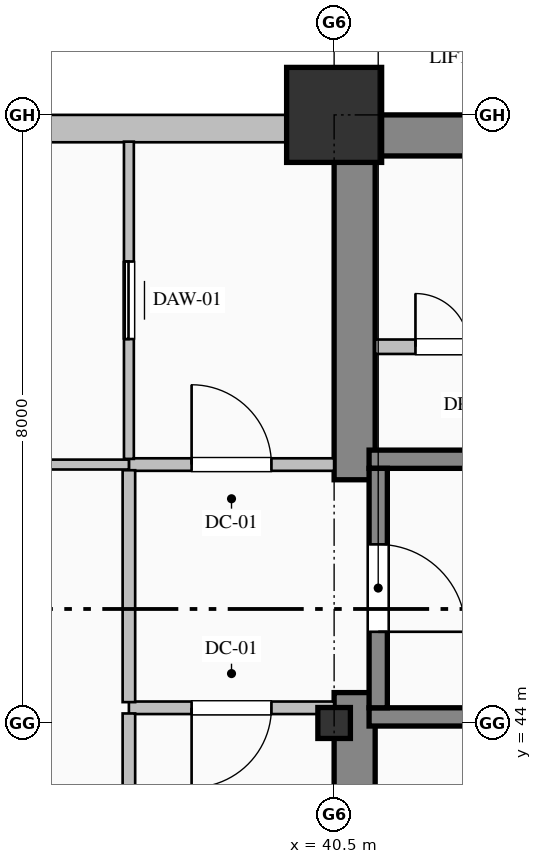
"""IFC4 building model, lengths in metres.
Left out: names, types, materials, properties, quantities, classifications, styles, units other than length and angle.
Written with IfcOpenShell. Run it as: python <this file> out.ifc"""

import sys

from ifc_helpers import new_model, si_unit, direction, frame, frame_2d, origin, origin_2d, place, context, subcontext, project, spatial, rectangle, hollow_rectangle, i_section, extrude, element, fill, save


model = new_model("IFC4")
c1 = context("Model", 3, precision=1e-05, world=origin(), true_north=direction((0.0, 1.0)))
c2 = subcontext(c1, "Body", "Model", "MODEL_VIEW")
j1 = project(units=[si_unit("LENGTHUNIT", "METRE"), si_unit("PLANEANGLEUNIT", "RADIAN")], contexts=[c1])
p1 = place(None, origin())
s1 = spatial("IfcSite", under=j1, at=p1, CompositionType="ELEMENT")
p2 = place(p1, origin())
s2 = spatial("IfcBuilding", under=s1, at=p2, CompositionType="ELEMENT")
p3 = place(p2, frame((0.0, 0.0, 80.2)))
s3 = spatial("IfcBuildingStorey", under=s2, at=p3, CompositionType="ELEMENT", Elevation=80.2)
p4 = place(p3, frame((40.5, 51.73, 0.0), z_axis=(0.0, 0.0, 1.0), x_axis=(1.0, 0.0, 0.0)))
e1 = element("IfcWall", 1, at=p4, inside=s3, PredefinedType="SHEAR", context=c2, shape_type="SweptSolid", body=[
    extrude(rectangle(XDim=23.5, YDim=0.54, at=frame_2d((11.75, 0.0))), origin(), (0.0, 0.0, 1.0), 3.75),
])
p5 = place(p3, frame((40.77, 36.54, 0.0), z_axis=(0.0, 0.0, 1.0), x_axis=(0.0, 1.0, 0.0)))
e2 = element("IfcWall", 2, at=p5, inside=s3, PredefinedType="SHEAR", context=c2, shape_type="SweptSolid", body=[
    extrude(rectangle(XDim=7.86, YDim=0.54, at=frame_2d((3.93, 0.0))), origin(), (0.0, 0.0, 1.0), 3.75),
])
p6 = place(p3, frame((40.77, 47.2, 0.0), z_axis=(0.0, 0.0, 1.0), x_axis=(0.0, 1.0, 0.0)))
e3 = element("IfcWall", 3, at=p6, inside=s3, PredefinedType="SHEAR", context=c2, shape_type="SweptSolid", body=[
    extrude(rectangle(XDim=4.26, YDim=0.54, at=frame_2d((2.13, 0.0))), origin(), (0.0, 0.0, 1.0), 3.75),
])
p7 = place(p3, frame((40.5, 44.0, 0.0), z_axis=(0.0, 0.0, 1.0), x_axis=(1.0, 0.0, 0.0)))
e4 = element("IfcColumn", 4, at=p7, inside=s3, PredefinedType="COLUMN", context=c2, shape_type="SweptSolid", body=[
    extrude(i_section(OverallWidth=0.407, OverallDepth=0.428, WebThickness=0.02, FlangeThickness=0.035, FilletRadius=0.022, at=origin_2d()), origin(), (0.0, 0.0, 1.0), 4.0),
])
p8 = place(p3, frame((40.5, 52.0, 0.0), z_axis=(0.0, 0.0, 1.0), x_axis=(1.0, 0.0, 0.0)))
e5 = element("IfcColumn", 5, at=p8, inside=s3, PredefinedType="COLUMN", context=c2, shape_type="SweptSolid", body=[
    extrude(hollow_rectangle(XDim=1.25, YDim=1.25, WallThickness=0.045, at=origin_2d()), origin(), (0.0, 0.0, 1.0), 4.0),
])
p9 = place(p3, frame((4.0, 51.82, 0.0), z_axis=(0.0, 0.0, 1.0), x_axis=(1.0, 0.0, 0.0)))
e6 = element("IfcWall", 6, at=p9, inside=s3, PredefinedType="SOLIDWALL", context=c2, shape_type="SweptSolid", body=[
    extrude(rectangle(XDim=36.52, YDim=0.36, at=frame_2d((18.26, 0.0))), origin(), (0.0, 0.0, 1.0), 3.25),
])
p10 = place(p9, frame((6.15, 0.0, 0.85)))
e7 = element("IfcOpeningElement", 7, at=p10, cuts=e6, PredefinedType="OPENING", context=c2, shape_type="SweptSolid", body=[
    extrude(rectangle(XDim=2.1, YDim=2.05, at=frame_2d((1.05, 1.025))), frame((0.0, 0.19, 0.0), z_axis=(0.0, -1.0, 0.0), x_axis=(1.0, 0.0, 0.0)), (0.0, 0.0, 1.0), 0.38),
])
p11 = place(p9, frame((13.5, 0.0, 0.85)))
e8 = element("IfcOpeningElement", 8, at=p11, cuts=e6, PredefinedType="OPENING", context=c2, shape_type="SweptSolid", body=[
    extrude(rectangle(XDim=1.8, YDim=2.05, at=frame_2d((0.9, 1.025))), frame((0.0, 0.19, 0.0), z_axis=(0.0, -1.0, 0.0), x_axis=(1.0, 0.0, 0.0)), (0.0, 0.0, 1.0), 0.38),
])
p12 = place(p9, frame((16.95, 0.0, 0.85)))
e9 = element("IfcOpeningElement", 9, at=p12, cuts=e6, PredefinedType="OPENING", context=c2, shape_type="SweptSolid", body=[
    extrude(rectangle(XDim=2.1, YDim=2.05, at=frame_2d((1.05, 1.025))), frame((0.0, 0.19, 0.0), z_axis=(0.0, -1.0, 0.0), x_axis=(1.0, 0.0, 0.0)), (0.0, 0.0, 1.0), 0.38),
])
p13 = place(p9, frame((24.3, 0.0, 0.85)))
e10 = element("IfcOpeningElement", 10, at=p13, cuts=e6, PredefinedType="OPENING", context=c2, shape_type="SweptSolid", body=[
    extrude(rectangle(XDim=1.8, YDim=2.05, at=frame_2d((0.9, 1.025))), frame((0.0, 0.19, 0.0), z_axis=(0.0, -1.0, 0.0), x_axis=(1.0, 0.0, 0.0)), (0.0, 0.0, 1.0), 0.38),
])
for number, where, z_axis, x_axis in (
    (11, (40.96, 47.47, 0.0), (0.0, 0.0, 1.0), (1.0, 0.0, 0.0)),
    (12, (49.04, 44.08, 0.0), (0.0, 0.0, 1.0), (-1.0, 0.0, 0.0)),
):
    element("IfcWall", number, at=place(p3, frame(where, z_axis=z_axis, x_axis=x_axis)), inside=s3, PredefinedType="SOLIDWALL", context=c2, shape_type="SweptSolid", body=[
        extrude(rectangle(XDim=8.08, YDim=0.24, at=frame_2d((4.04, 0.0))), origin(), (0.0, 0.0, 1.0), 4.0),
    ])
p14 = place(p3, frame((41.08, 47.35, 0.0), z_axis=(0.0, 0.0, 1.0), x_axis=(0.0, -1.0, 0.0)))
e13 = element("IfcWall", 13, at=p14, inside=s3, PredefinedType="SOLIDWALL", context=c2, shape_type="SweptSolid", body=[
    extrude(rectangle(XDim=3.15, YDim=0.24, at=frame_2d((1.575, 0.0))), origin(), (0.0, 0.0, 1.0), 4.0),
])
p15 = place(p14, frame((1.0, 0.0, 0.0)))
e14 = element("IfcOpeningElement", 14, at=p15, cuts=e13, PredefinedType="OPENING", context=c2, shape_type="SweptSolid", body=[
    extrude(rectangle(XDim=1.15, YDim=2.2, at=frame_2d((0.575, 1.1))), frame((0.0, 0.13, 0.0), z_axis=(0.0, -1.0, 0.0), x_axis=(1.0, 0.0, 0.0)), (0.0, 0.0, 1.0), 0.26),
])
p16 = place(p3, frame((37.8, 47.4, 0.0), z_axis=(0.0, 0.0, 1.0), x_axis=(1.0, 0.0, 0.0)))
e15 = element("IfcWall", 15, at=p16, inside=s3, PredefinedType="PARTITIONING", context=c2, shape_type="SweptSolid", body=[
    extrude(rectangle(XDim=2.7, YDim=0.165, at=frame_2d((1.35, 0.0))), origin(), (0.0, 0.0, 1.0), 3.75),
])
p17 = place(p16, frame((0.825, 0.0, 0.0)))
e16 = element("IfcOpeningElement", 16, at=p17, cuts=e15, PredefinedType="OPENING", context=c2, shape_type="SweptSolid", body=[
    extrude(rectangle(XDim=1.05, YDim=2.15, at=frame_2d((0.525, 1.075))), frame((0.0, 0.093, 0.0), z_axis=(0.0, -1.0, 0.0), x_axis=(1.0, 0.0, 0.0)), (0.0, 0.0, 1.0), 0.185),
])
p18 = place(p3, frame((40.5, 44.2, 0.0), z_axis=(0.0, 0.0, 1.0), x_axis=(-1.0, 0.0, 0.0)))
e17 = element("IfcWall", 17, at=p18, inside=s3, PredefinedType="PARTITIONING", context=c2, shape_type="SweptSolid", body=[
    extrude(rectangle(XDim=2.7, YDim=0.165, at=frame_2d((1.35, 0.0))), origin(), (0.0, 0.0, 1.0), 3.75),
])
p19 = place(p18, frame((0.825, 0.0, 0.0)))
e18 = element("IfcOpeningElement", 18, at=p19, cuts=e17, PredefinedType="OPENING", context=c2, shape_type="SweptSolid", body=[
    extrude(rectangle(XDim=1.05, YDim=2.15, at=frame_2d((0.525, 1.075))), frame((0.0, 0.093, 0.0), z_axis=(0.0, -1.0, 0.0), x_axis=(1.0, 0.0, 0.0)), (0.0, 0.0, 1.0), 0.185),
])
p20 = place(p3, frame((37.8, 44.274, 0.0), z_axis=(0.0, 0.0, 1.0), x_axis=(0.0, 1.0, 0.0)))
e19 = element("IfcWall", 19, at=p20, inside=s3, PredefinedType="PARTITIONING", context=c2, shape_type="SweptSolid", body=[
    extrude(rectangle(XDim=3.051, YDim=0.165, at=frame_2d((1.525, 0.0))), origin(), (0.0, 0.0, 1.0), 3.75),
])
p21 = place(p3, frame((37.8, 47.475, 0.0), z_axis=(0.0, 0.0, 1.0), x_axis=(0.0, 1.0, 0.0)))
e20 = element("IfcWall", 20, at=p21, inside=s3, PredefinedType="PARTITIONING", context=c2, shape_type="SweptSolid", body=[
    extrude(rectangle(XDim=4.173, YDim=0.13, at=frame_2d((2.087, 0.0))), origin(), (0.0, 0.0, 1.0), 3.75),
])
p22 = place(p21, frame((1.577, 0.0, 0.0)))
e21 = element("IfcOpeningElement", 21, at=p22, cuts=e20, PredefinedType="OPENING", context=c2, shape_type="SweptSolid", body=[
    extrude(rectangle(XDim=1.02, YDim=2.15, at=frame_2d((0.51, 1.075))), frame((0.0, 0.075, 0.0), z_axis=(0.0, -1.0, 0.0), x_axis=(1.0, 0.0, 0.0)), (0.0, 0.0, 1.0), 0.15),
])
p23 = place(p3, frame((37.8, 47.4, 0.0), z_axis=(0.0, 0.0, 1.0), x_axis=(-1.0, 0.0, 0.0)))
e22 = element("IfcWall", 22, at=p23, inside=s3, PredefinedType="PARTITIONING", context=c2, shape_type="SweptSolid", body=[
    extrude(rectangle(XDim=2.4, YDim=0.13, at=frame_2d((1.2, 0.0))), origin(), (0.0, 0.0, 1.0), 3.75),
])
p24 = place(p3, frame((41.04, 48.95, 0.0), z_axis=(0.0, 0.0, 1.0), x_axis=(1.0, 0.0, 0.0)))
e23 = element("IfcWall", 23, at=p24, inside=s3, PredefinedType="PARTITIONING", context=c2, shape_type="SweptSolid", body=[
    extrude(rectangle(XDim=2.46, YDim=0.19, at=frame_2d((1.23, 0.0))), origin(), (0.0, 0.0, 1.0), 3.75),
])
p25 = place(p24, frame((0.53, 0.0, 0.0)))
e24 = element("IfcOpeningElement", 24, at=p25, cuts=e23, PredefinedType="OPENING", context=c2, shape_type="SweptSolid", body=[
    extrude(rectangle(XDim=1.4, YDim=2.25, at=frame_2d((0.7, 1.125))), frame((0.0, 0.105, 0.0), z_axis=(0.0, -1.0, 0.0), x_axis=(1.0, 0.0, 0.0)), (0.0, 0.0, 1.0), 0.21),
])
p26 = place(p3, frame((37.8, 40.475, 0.0), z_axis=(0.0, 0.0, 1.0), x_axis=(0.0, 1.0, 0.0)))
e25 = element("IfcWall", 25, at=p26, inside=s3, PredefinedType="PARTITIONING", context=c2, shape_type="SweptSolid", body=[
    extrude(rectangle(XDim=3.651, YDim=0.165, at=frame_2d((1.825, 0.0))), origin(), (0.0, 0.0, 1.0), 3.75),
])
p27 = place(p15, origin())
e26 = element("IfcDoor", 26, at=p27, inside=s3, OperationType="SINGLE_SWING_RIGHT", PredefinedType="DOOR", context=c2, shape_type="SweptSolid", body=[
    extrude(rectangle(XDim=1.15, YDim=2.2, at=frame_2d((0.575, 1.1))), frame((0.0, 0.025, 0.0), z_axis=(0.0, -1.0, 0.0), x_axis=(1.0, 0.0, 0.0)), (0.0, 0.0, 1.0), 0.05),
])
fill(e14, e26)
p28 = place(p17, origin())
e27 = element("IfcDoor", 27, at=p28, inside=s3, OperationType="SINGLE_SWING_LEFT", PredefinedType="DOOR", context=c2, shape_type="SweptSolid", body=[
    extrude(rectangle(XDim=1.05, YDim=2.15, at=frame_2d((0.525, 1.075))), frame((0.0, 0.025, 0.0), z_axis=(0.0, -1.0, 0.0), x_axis=(1.0, 0.0, 0.0)), (0.0, 0.0, 1.0), 0.05),
])
fill(e16, e27)
p29 = place(p19, origin())
e28 = element("IfcDoor", 28, at=p29, inside=s3, OperationType="SINGLE_SWING_RIGHT", PredefinedType="DOOR", context=c2, shape_type="SweptSolid", body=[
    extrude(rectangle(XDim=1.05, YDim=2.15, at=frame_2d((0.525, 1.075))), frame((0.0, 0.025, 0.0), z_axis=(0.0, -1.0, 0.0), x_axis=(1.0, 0.0, 0.0)), (0.0, 0.0, 1.0), 0.05),
])
fill(e18, e28)
p30 = place(p22, origin())
e29 = element("IfcDoor", 29, at=p30, inside=s3, OperationType="SLIDING_TO_LEFT", PredefinedType="DOOR", context=c2, shape_type="SweptSolid", body=[
    extrude(rectangle(XDim=1.02, YDim=2.15, at=frame_2d((0.51, 1.075))), frame((0.0, 0.025, 0.0), z_axis=(0.0, -1.0, 0.0), x_axis=(1.0, 0.0, 0.0)), (0.0, 0.0, 1.0), 0.05),
])
fill(e21, e29)
p31 = place(p25, origin())
e30 = element("IfcDoor", 30, at=p31, inside=s3, OperationType="DOUBLE_DOOR_SINGLE_SWING", PredefinedType="DOOR", context=c2, shape_type="SweptSolid", body=[
    extrude(rectangle(XDim=1.4, YDim=2.25, at=frame_2d((0.7, 1.125))), frame((0.0, 0.025, 0.0), z_axis=(0.0, -1.0, 0.0), x_axis=(1.0, 0.0, 0.0)), (0.0, 0.0, 1.0), 0.05),
])
fill(e24, e30)
save(model, sys.argv[1])
